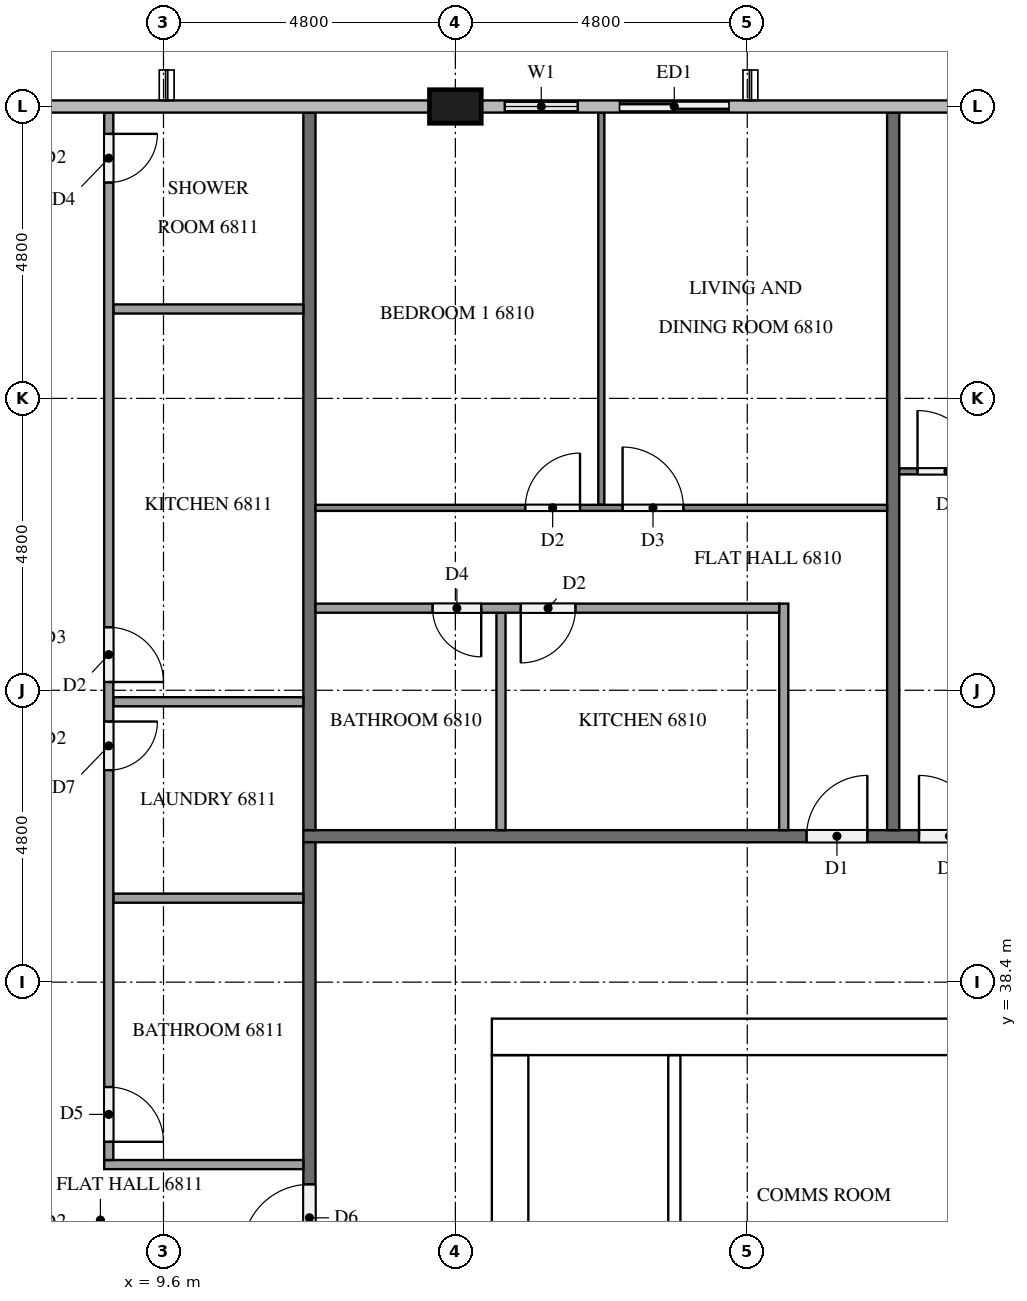
"""IFC4 building model, lengths in metres.
Left out: names, types, materials, properties, quantities, classifications, styles, units other than length and angle.
Written with IfcOpenShell. Run it as: python <this file> out.ifc"""

import sys

from ifc_helpers import new_model, si_unit, direction, frame, frame_2d, origin, origin_2d, place, context, subcontext, project, spatial, rectangle, extrude, element, fill, save


model = new_model("IFC4")
c1 = context("Model", 3, precision=1e-05, world=origin(), true_north=direction((0.0, 1.0)))
c2 = subcontext(c1, "Body", "Model", "MODEL_VIEW")
j1 = project(units=[si_unit("LENGTHUNIT", "METRE"), si_unit("PLANEANGLEUNIT", "RADIAN")], contexts=[c1])
p1 = place(None, origin())
s1 = spatial("IfcSite", under=j1, at=p1, CompositionType="ELEMENT")
p2 = place(p1, origin())
s2 = spatial("IfcBuilding", under=s1, at=p2, CompositionType="ELEMENT")
p3 = place(p2, frame((0.0, 0.0, 259.7)))
s3 = spatial("IfcBuildingStorey", under=s2, at=p3, CompositionType="ELEMENT", Elevation=259.7)
p4 = place(p3, frame((15.0, 37.5, 0.0), z_axis=(0.0, 0.0, 1.0), x_axis=(1.0, 0.0, 0.0)))
e1 = element("IfcWall", 1, at=p4, inside=s3, PredefinedType="SHEAR", context=c2, shape_type="SweptSolid", body=[
    extrude(rectangle(XDim=32.4, YDim=0.6, at=frame_2d((16.2, 0.0))), origin(), (0.0, 0.0, 1.0), 3.1),
])
p5 = place(p4, frame((15.3, 0.0, 0.0)))
e2 = element("IfcOpeningElement", 2, at=p5, cuts=e1, PredefinedType="OPENING", context=c2, shape_type="SweptSolid", body=[
    extrude(rectangle(XDim=1.8, YDim=2.1, at=frame_2d((0.9, 1.05))), frame((0.0, 0.31, 0.0), z_axis=(0.0, -1.0, 0.0), x_axis=(1.0, 0.0, 0.0)), (0.0, 0.0, 1.0), 0.62),
])
p6 = place(p4, frame((1.25, 0.0, 0.0)))
e3 = element("IfcOpeningElement", 3, at=p6, cuts=e1, PredefinedType="OPENING", context=c2, shape_type="SweptSolid", body=[
    extrude(rectangle(XDim=1.0, YDim=2.1, at=frame_2d((0.5, 1.05))), frame((0.0, 0.31, 0.0), z_axis=(0.0, -1.0, 0.0), x_axis=(1.0, 0.0, 0.0)), (0.0, 0.0, 1.0), 0.62),
])
p7 = place(p4, frame((4.988, 0.0, 0.0)))
e4 = element("IfcOpeningElement", 4, at=p7, cuts=e1, PredefinedType="OPENING", context=c2, shape_type="SweptSolid", body=[
    extrude(rectangle(XDim=1.0, YDim=2.1, at=frame_2d((0.5, 1.05))), frame((0.0, 0.31, 0.0), z_axis=(0.0, -1.0, 0.0), x_axis=(1.0, 0.0, 0.0)), (0.0, 0.0, 1.0), 0.62),
])
p8 = place(p3, frame((15.3, 15.6, 0.0), z_axis=(0.0, 0.0, 1.0), x_axis=(0.0, 1.0, 0.0)))
e5 = element("IfcWall", 5, at=p8, inside=s3, PredefinedType="SHEAR", context=c2, shape_type="SweptSolid", body=[
    extrude(rectangle(XDim=21.6, YDim=0.6, at=frame_2d((10.8, 0.0))), origin(), (0.0, 0.0, 1.0), 3.1),
])
p9 = place(p8, frame((5.16, 0.0, 0.0)))
e6 = element("IfcOpeningElement", 6, at=p9, cuts=e5, PredefinedType="OPENING", context=c2, shape_type="SweptSolid", body=[
    extrude(rectangle(XDim=1.2, YDim=2.1, at=frame_2d((0.6, 1.05))), frame((0.0, 0.31, 0.0), z_axis=(0.0, -1.0, 0.0), x_axis=(1.0, 0.0, 0.0)), (0.0, 0.0, 1.0), 0.62),
])
p10 = place(p3, frame((14.4, 52.8, 0.0), z_axis=(0.0, 0.0, 1.0), x_axis=(1.0, 0.0, 0.0)))
e7 = element("IfcColumn", 7, at=p10, inside=s3, PredefinedType="COLUMN", context=c2, shape_type="SweptSolid", body=[
    extrude(rectangle(XDim=0.85, YDim=0.55, at=origin_2d()), origin(), (0.0, 0.0, 1.0), 3.1),
])
p11 = place(p3, frame((19.2, 52.8, 0.0), z_axis=(0.0, 0.0, 1.0), x_axis=(-1.0, 0.0, 0.0)))
e8 = element("IfcWall", 8, at=p11, inside=s3, PredefinedType="SOLIDWALL", context=c2, shape_type="SweptSolid", body=[
    extrude(rectangle(XDim=4.375, YDim=0.15, at=frame_2d((2.188, 0.0))), origin(), (0.0, 0.0, 1.0), 3.1),
])
p12 = place(p11, frame((0.3, 0.0, 0.0)))
e9 = element("IfcOpeningElement", 9, at=p12, cuts=e8, PredefinedType="OPENING", context=c2, shape_type="SweptSolid", body=[
    extrude(rectangle(XDim=1.8, YDim=2.4, at=frame_2d((0.9, 1.2))), frame((0.0, 0.085, 0.0), z_axis=(0.0, -1.0, 0.0), x_axis=(1.0, 0.0, 0.0)), (0.0, 0.0, 1.0), 0.17),
])
p13 = place(p11, frame((2.788, 0.0, 0.9)))
e10 = element("IfcOpeningElement", 10, at=p13, cuts=e8, PredefinedType="OPENING", context=c2, shape_type="SweptSolid", body=[
    extrude(rectangle(XDim=1.2, YDim=1.4, at=frame_2d((0.6, 0.7))), frame((0.0, 0.085, 0.0), z_axis=(0.0, -1.0, 0.0), x_axis=(1.0, 0.0, 0.0)), (0.0, 0.0, 1.0), 0.17),
])
p14 = place(p3, frame((18.001, 31.475, 0.0), z_axis=(0.0, 0.0, 1.0), x_axis=(0.0, 1.0, 0.0)))
e11 = element("IfcWall", 11, at=p14, inside=s3, PredefinedType="PARTITIONING", context=c2, shape_type="SweptSolid", body=[
    extrude(rectangle(XDim=5.725, YDim=0.2, at=frame_2d((2.862, 0.0))), origin(), (0.0, 0.0, 1.0), 3.1),
])
p15 = place(p3, frame((11.9, 40.8, 0.0), z_axis=(0.0, 0.0, 1.0), x_axis=(1.0, 0.0, 0.0)))
e12 = element("IfcWall", 12, at=p15, inside=s3, PredefinedType="PARTITIONING", context=c2, shape_type="SweptSolid", body=[
    extrude(rectangle(XDim=38.6, YDim=0.2, at=frame_2d((19.3, 0.0))), origin(), (0.0, 0.0, 1.0), 3.1),
])
p16 = place(p15, frame((34.125, 0.0, 0.0)))
e13 = element("IfcOpeningElement", 13, at=p16, cuts=e12, PredefinedType="OPENING", context=c2, shape_type="SweptSolid", body=[
    extrude(rectangle(XDim=1.0, YDim=2.1, at=frame_2d((0.5, 1.05))), frame((0.0, 0.11, 0.0), z_axis=(0.0, -1.0, 0.0), x_axis=(1.0, 0.0, 0.0)), (0.0, 0.0, 1.0), 0.22),
])
p17 = place(p15, frame((24.525, 0.0, 0.0)))
e14 = element("IfcOpeningElement", 14, at=p17, cuts=e12, PredefinedType="OPENING", context=c2, shape_type="SweptSolid", body=[
    extrude(rectangle(XDim=1.0, YDim=2.1, at=frame_2d((0.5, 1.05))), frame((0.0, 0.11, 0.0), z_axis=(0.0, -1.0, 0.0), x_axis=(1.0, 0.0, 0.0)), (0.0, 0.0, 1.0), 0.22),
])
p18 = place(p15, frame((10.125, 0.0, 0.0)))
e15 = element("IfcOpeningElement", 15, at=p18, cuts=e12, PredefinedType="OPENING", context=c2, shape_type="SweptSolid", body=[
    extrude(rectangle(XDim=1.0, YDim=2.1, at=frame_2d((0.5, 1.05))), frame((0.0, 0.11, 0.0), z_axis=(0.0, -1.0, 0.0), x_axis=(1.0, 0.0, 0.0)), (0.0, 0.0, 1.0), 0.22),
])
p19 = place(p15, frame((8.275, 0.0, 0.0)))
e16 = element("IfcOpeningElement", 16, at=p19, cuts=e12, PredefinedType="OPENING", context=c2, shape_type="SweptSolid", body=[
    extrude(rectangle(XDim=1.0, YDim=2.1, at=frame_2d((0.5, 1.05))), frame((0.0, 0.11, 0.0), z_axis=(0.0, -1.0, 0.0), x_axis=(1.0, 0.0, 0.0)), (0.0, 0.0, 1.0), 0.22),
])
p20 = place(p3, frame((12.0, 12.1, 0.0), z_axis=(0.0, 0.0, 1.0), x_axis=(0.0, 1.0, 0.0)))
e17 = element("IfcWall", 17, at=p20, inside=s3, PredefinedType="PARTITIONING", context=c2, shape_type="SweptSolid", body=[
    extrude(rectangle(XDim=28.6, YDim=0.2, at=frame_2d((14.3, 0.0))), origin(), (0.0, 0.0, 1.0), 3.1),
])
p21 = place(p20, frame((21.875, 0.0, 0.0)))
e18 = element("IfcOpeningElement", 18, at=p21, cuts=e17, PredefinedType="OPENING", context=c2, shape_type="SweptSolid", body=[
    extrude(rectangle(XDim=1.1, YDim=2.1, at=frame_2d((0.55, 1.05))), frame((0.0, 0.11, 0.0), z_axis=(0.0, -1.0, 0.0), x_axis=(1.0, 0.0, 0.0)), (0.0, 0.0, 1.0), 0.22),
])
p22 = place(p20, frame((20.075, 0.0, 0.0)))
e19 = element("IfcOpeningElement", 19, at=p22, cuts=e17, PredefinedType="OPENING", context=c2, shape_type="SweptSolid", body=[
    extrude(rectangle(XDim=1.0, YDim=2.1, at=frame_2d((0.5, 1.05))), frame((0.0, 0.11, 0.0), z_axis=(0.0, -1.0, 0.0), x_axis=(1.0, 0.0, 0.0)), (0.0, 0.0, 1.0), 0.22),
])
p23 = place(p20, frame((5.675, 0.0, 0.0)))
e20 = element("IfcOpeningElement", 20, at=p23, cuts=e17, PredefinedType="OPENING", context=c2, shape_type="SweptSolid", body=[
    extrude(rectangle(XDim=1.0, YDim=2.1, at=frame_2d((0.5, 1.05))), frame((0.0, 0.11, 0.0), z_axis=(0.0, -1.0, 0.0), x_axis=(1.0, 0.0, 0.0)), (0.0, 0.0, 1.0), 0.22),
])
for number, where, z_axis, x_axis in (
    (21, (21.6, 52.7, 0.0), (0.0, 0.0, 1.0), (0.0, -1.0, 0.0)),
    (22, (12.0, 52.7, 0.0), (0.0, 0.0, 1.0), (0.0, -1.0, 0.0)),
):
    element("IfcWall", number, at=place(p3, frame(where, z_axis=z_axis, x_axis=x_axis)), inside=s3, PredefinedType="PARTITIONING", context=c2, shape_type="SweptSolid", body=[
        extrude(rectangle(XDim=11.8, YDim=0.2, at=frame_2d((5.9, 0.0))), origin(), (0.0, 0.0, 1.0), 3.1),
    ])
p24 = place(p3, frame((21.7, 46.8, 0.0), z_axis=(0.0, 0.0, 1.0), x_axis=(1.0, 0.0, 0.0)))
e23 = element("IfcWall", 23, at=p24, inside=s3, PredefinedType="PARTITIONING", context=c2, shape_type="SweptSolid", body=[
    extrude(rectangle(XDim=14.2, YDim=0.1, at=frame_2d((7.1, 0.0))), origin(), (0.0, 0.0, 1.0), 3.1),
])
p25 = place(p24, frame((0.3, 0.0, 0.0)))
e24 = element("IfcOpeningElement", 24, at=p25, cuts=e23, PredefinedType="OPENING", context=c2, shape_type="SweptSolid", body=[
    extrude(rectangle(XDim=1.0, YDim=2.1, at=frame_2d((0.5, 1.05))), frame((0.0, 0.06, 0.0), z_axis=(0.0, -1.0, 0.0), x_axis=(1.0, 0.0, 0.0)), (0.0, 0.0, 1.0), 0.12),
])
p26 = place(p24, frame((8.25, 0.0, 0.0)))
e25 = element("IfcOpeningElement", 25, at=p26, cuts=e23, PredefinedType="OPENING", context=c2, shape_type="SweptSolid", body=[
    extrude(rectangle(XDim=0.9, YDim=2.1, at=frame_2d((0.45, 1.05))), frame((0.0, 0.06, 0.0), z_axis=(0.0, -1.0, 0.0), x_axis=(1.0, 0.0, 0.0)), (0.0, 0.0, 1.0), 0.12),
])
p27 = place(p24, frame((9.85, 0.0, 0.0)))
e26 = element("IfcOpeningElement", 26, at=p27, cuts=e23, PredefinedType="OPENING", context=c2, shape_type="SweptSolid", body=[
    extrude(rectangle(XDim=0.9, YDim=2.1, at=frame_2d((0.45, 1.05))), frame((0.0, 0.06, 0.0), z_axis=(0.0, -1.0, 0.0), x_axis=(1.0, 0.0, 0.0)), (0.0, 0.0, 1.0), 0.12),
])
p28 = place(p3, frame((16.8, 46.25, 0.0), z_axis=(0.0, 0.0, 1.0), x_axis=(0.0, 1.0, 0.0)))
e27 = element("IfcWall", 27, at=p28, inside=s3, PredefinedType="PARTITIONING", context=c2, shape_type="SweptSolid", body=[
    extrude(rectangle(XDim=6.45, YDim=0.1, at=frame_2d((3.225, 0.0))), origin(), (0.0, 0.0, 1.0), 3.1),
])
p29 = place(p3, frame((12.1, 46.2, 0.0), z_axis=(0.0, 0.0, 1.0), x_axis=(1.0, 0.0, 0.0)))
e28 = element("IfcWall", 28, at=p29, inside=s3, PredefinedType="PARTITIONING", context=c2, shape_type="SweptSolid", body=[
    extrude(rectangle(XDim=9.4, YDim=0.1, at=frame_2d((4.7, 0.0))), origin(), (0.0, 0.0, 1.0), 3.1),
])
p30 = place(p29, frame((5.05, 0.0, 0.0)))
e29 = element("IfcOpeningElement", 29, at=p30, cuts=e28, PredefinedType="OPENING", context=c2, shape_type="SweptSolid", body=[
    extrude(rectangle(XDim=1.0, YDim=2.1, at=frame_2d((0.5, 1.05))), frame((0.0, 0.06, 0.0), z_axis=(0.0, -1.0, 0.0), x_axis=(1.0, 0.0, 0.0)), (0.0, 0.0, 1.0), 0.12),
])
p31 = place(p29, frame((3.45, 0.0, 0.0)))
e30 = element("IfcOpeningElement", 30, at=p31, cuts=e28, PredefinedType="OPENING", context=c2, shape_type="SweptSolid", body=[
    extrude(rectangle(XDim=0.9, YDim=2.1, at=frame_2d((0.45, 1.05))), frame((0.0, 0.06, 0.0), z_axis=(0.0, -1.0, 0.0), x_axis=(1.0, 0.0, 0.0)), (0.0, 0.0, 1.0), 0.12),
])
p32 = place(p3, frame((15.15, 40.9, 0.0), z_axis=(0.0, 0.0, 1.0), x_axis=(0.0, 1.0, 0.0)))
e31 = element("IfcWall", 31, at=p32, inside=s3, PredefinedType="PARTITIONING", context=c2, shape_type="SweptSolid", body=[
    extrude(rectangle(XDim=3.575, YDim=0.15, at=frame_2d((1.788, 0.0))), origin(), (0.0, 0.0, 1.0), 3.1),
])
p33 = place(p3, frame((19.8, 40.9, 0.0), z_axis=(0.0, 0.0, 1.0), x_axis=(0.0, 1.0, 0.0)))
e32 = element("IfcWall", 32, at=p33, inside=s3, PredefinedType="PARTITIONING", context=c2, shape_type="SweptSolid", body=[
    extrude(rectangle(XDim=3.725, YDim=0.15, at=frame_2d((1.863, 0.0))), origin(), (0.0, 0.0, 1.0), 3.1),
])
p34 = place(p3, frame((19.725, 44.55, 0.0), z_axis=(0.0, 0.0, 1.0), x_axis=(-1.0, 0.0, 0.0)))
e33 = element("IfcWall", 33, at=p34, inside=s3, PredefinedType="PARTITIONING", context=c2, shape_type="SweptSolid", body=[
    extrude(rectangle(XDim=7.625, YDim=0.15, at=frame_2d((3.812, 0.0))), origin(), (0.0, 0.0, 1.0), 3.1),
])
p35 = place(p34, frame((3.35, 0.0, 0.0)))
e34 = element("IfcOpeningElement", 34, at=p35, cuts=e33, PredefinedType="OPENING", context=c2, shape_type="SweptSolid", body=[
    extrude(rectangle(XDim=0.9, YDim=2.1, at=frame_2d((0.45, 1.05))), frame((0.0, 0.085, 0.0), z_axis=(0.0, -1.0, 0.0), x_axis=(1.0, 0.0, 0.0)), (0.0, 0.0, 1.0), 0.17),
])
p36 = place(p34, frame((4.9, 0.0, 0.0)))
e35 = element("IfcOpeningElement", 35, at=p36, cuts=e33, PredefinedType="OPENING", context=c2, shape_type="SweptSolid", body=[
    extrude(rectangle(XDim=0.8, YDim=2.1, at=frame_2d((0.4, 1.05))), frame((0.0, 0.085, 0.0), z_axis=(0.0, -1.0, 0.0), x_axis=(1.0, 0.0, 0.0)), (0.0, 0.0, 1.0), 0.17),
])
for number, where, z_axis, x_axis in (
    (36, (11.9, 39.781, 0.0), (0.0, 0.0, 1.0), (-1.0, 0.0, 0.0)),
    (37, (11.9, 43.011, 0.0), (0.0, 0.0, 1.0), (-1.0, 0.0, 0.0)),
    (38, (11.9, 49.47, 0.0), (0.0, 0.0, 1.0), (-1.0, 0.0, 0.0)),
):
    element("IfcWall", number, at=place(p3, frame(where, z_axis=z_axis, x_axis=x_axis)), inside=s3, PredefinedType="PARTITIONING", context=c2, shape_type="SweptSolid", body=[
        extrude(rectangle(XDim=3.125, YDim=0.15, at=frame_2d((1.562, 0.0))), origin(), (0.0, 0.0, 1.0), 3.1),
    ])
p37 = place(p3, frame((11.9, 35.4, 0.0), z_axis=(0.0, 0.0, 1.0), x_axis=(-1.0, 0.0, 0.0)))
e39 = element("IfcWall", 39, at=p37, inside=s3, PredefinedType="PARTITIONING", context=c2, shape_type="SweptSolid", body=[
    extrude(rectangle(XDim=3.275, YDim=0.15, at=frame_2d((1.637, 0.0))), origin(), (0.0, 0.0, 1.0), 3.1),
])
p38 = place(p3, frame((8.7, 52.7, 0.0), z_axis=(0.0, 0.0, 1.0), x_axis=(0.0, -1.0, 0.0)))
e40 = element("IfcWall", 40, at=p38, inside=s3, PredefinedType="PARTITIONING", context=c2, shape_type="SweptSolid", body=[
    extrude(rectangle(XDim=17.225, YDim=0.15, at=frame_2d((8.612, 0.0))), origin(), (0.0, 0.0, 1.0), 3.1),
])
p39 = place(p38, frame((16.025, 0.0, 0.0)))
e41 = element("IfcOpeningElement", 41, at=p39, cuts=e40, PredefinedType="OPENING", context=c2, shape_type="SweptSolid", body=[
    extrude(rectangle(XDim=0.9, YDim=2.1, at=frame_2d((0.45, 1.05))), frame((0.0, 0.085, 0.0), z_axis=(0.0, -1.0, 0.0), x_axis=(1.0, 0.0, 0.0)), (0.0, 0.0, 1.0), 0.17),
])
p40 = place(p38, frame((10.014, 0.0, 0.0)))
e42 = element("IfcOpeningElement", 42, at=p40, cuts=e40, PredefinedType="OPENING", context=c2, shape_type="SweptSolid", body=[
    extrude(rectangle(XDim=0.8, YDim=2.1, at=frame_2d((0.4, 1.05))), frame((0.0, 0.085, 0.0), z_axis=(0.0, -1.0, 0.0), x_axis=(1.0, 0.0, 0.0)), (0.0, 0.0, 1.0), 0.17),
])
p41 = place(p38, frame((8.464, 0.0, 0.0)))
e43 = element("IfcOpeningElement", 43, at=p41, cuts=e40, PredefinedType="OPENING", context=c2, shape_type="SweptSolid", body=[
    extrude(rectangle(XDim=0.9, YDim=2.1, at=frame_2d((0.45, 1.05))), frame((0.0, 0.085, 0.0), z_axis=(0.0, -1.0, 0.0), x_axis=(1.0, 0.0, 0.0)), (0.0, 0.0, 1.0), 0.17),
])
p42 = place(p38, frame((0.35, 0.0, 0.0)))
e44 = element("IfcOpeningElement", 44, at=p42, cuts=e40, PredefinedType="OPENING", context=c2, shape_type="SweptSolid", body=[
    extrude(rectangle(XDim=0.8, YDim=2.1, at=frame_2d((0.4, 1.05))), frame((0.0, 0.085, 0.0), z_axis=(0.0, -1.0, 0.0), x_axis=(1.0, 0.0, 0.0)), (0.0, 0.0, 1.0), 0.17),
])
p43 = place(p12, origin())
e45 = element("IfcDoor", 45, at=p43, inside=s3, OperationType="SLIDING_TO_RIGHT", PredefinedType="DOOR", context=c2, shape_type="SweptSolid", body=[
    extrude(rectangle(XDim=1.8, YDim=2.4, at=frame_2d((0.9, 1.2))), frame((0.0, 0.025, 0.0), z_axis=(0.0, -1.0, 0.0), x_axis=(1.0, 0.0, 0.0)), (0.0, 0.0, 1.0), 0.05),
])
fill(e9, e45)
p44 = place(p13, origin())
e46 = element("IfcWindow", 46, at=p44, inside=s3, PartitioningType="SINGLE_PANEL", PredefinedType="WINDOW", context=c2, shape_type="SweptSolid", body=[
    extrude(rectangle(XDim=1.2, YDim=1.4, at=frame_2d((0.6, 0.7))), frame((0.0, 0.03, 0.0), z_axis=(0.0, -1.0, 0.0), x_axis=(1.0, 0.0, 0.0)), (0.0, 0.0, 1.0), 0.06),
])
fill(e10, e46)
p45 = place(p6, origin())
e47 = element("IfcDoor", 47, at=p45, inside=s3, OperationType="SINGLE_SWING_LEFT", PredefinedType="DOOR", context=c2, shape_type="SweptSolid", body=[
    extrude(rectangle(XDim=1.0, YDim=2.1, at=frame_2d((0.5, 1.05))), frame((0.0, 0.025, 0.0), z_axis=(0.0, -1.0, 0.0), x_axis=(1.0, 0.0, 0.0)), (0.0, 0.0, 1.0), 0.05),
])
fill(e3, e47)
p46 = place(p7, origin())
e48 = element("IfcDoor", 48, at=p46, inside=s3, OperationType="SINGLE_SWING_RIGHT", PredefinedType="DOOR", context=c2, shape_type="SweptSolid", body=[
    extrude(rectangle(XDim=1.0, YDim=2.1, at=frame_2d((0.5, 1.05))), frame((0.0, 0.025, 0.0), z_axis=(0.0, -1.0, 0.0), x_axis=(1.0, 0.0, 0.0)), (0.0, 0.0, 1.0), 0.05),
])
fill(e4, e48)
p47 = place(p18, origin())
e49 = element("IfcDoor", 49, at=p47, inside=s3, OperationType="SINGLE_SWING_LEFT", PredefinedType="DOOR", context=c2, shape_type="SweptSolid", body=[
    extrude(rectangle(XDim=1.0, YDim=2.1, at=frame_2d((0.5, 1.05))), frame((0.0, 0.025, 0.0), z_axis=(0.0, -1.0, 0.0), x_axis=(1.0, 0.0, 0.0)), (0.0, 0.0, 1.0), 0.05),
])
fill(e15, e49)
p48 = place(p19, origin())
e50 = element("IfcDoor", 50, at=p48, inside=s3, OperationType="SINGLE_SWING_RIGHT", PredefinedType="DOOR", context=c2, shape_type="SweptSolid", body=[
    extrude(rectangle(XDim=1.0, YDim=2.1, at=frame_2d((0.5, 1.05))), frame((0.0, 0.025, 0.0), z_axis=(0.0, -1.0, 0.0), x_axis=(1.0, 0.0, 0.0)), (0.0, 0.0, 1.0), 0.05),
])
fill(e16, e50)
p49 = place(p21, origin())
e51 = element("IfcDoor", 51, at=p49, inside=s3, OperationType="SINGLE_SWING_LEFT", PredefinedType="DOOR", context=c2, shape_type="SweptSolid", body=[
    extrude(rectangle(XDim=1.1, YDim=2.1, at=frame_2d((0.55, 1.05))), frame((0.0, 0.025, 0.0), z_axis=(0.0, -1.0, 0.0), x_axis=(1.0, 0.0, 0.0)), (0.0, 0.0, 1.0), 0.05),
])
fill(e18, e51)
p50 = place(p25, origin())
e52 = element("IfcDoor", 52, at=p50, inside=s3, OperationType="SINGLE_SWING_LEFT", PredefinedType="DOOR", context=c2, shape_type="SweptSolid", body=[
    extrude(rectangle(XDim=1.0, YDim=2.1, at=frame_2d((0.5, 1.05))), frame((0.0, 0.025, 0.0), z_axis=(0.0, -1.0, 0.0), x_axis=(1.0, 0.0, 0.0)), (0.0, 0.0, 1.0), 0.05),
])
fill(e24, e52)
p51 = place(p30, origin())
e53 = element("IfcDoor", 53, at=p51, inside=s3, OperationType="SINGLE_SWING_LEFT", PredefinedType="DOOR", context=c2, shape_type="SweptSolid", body=[
    extrude(rectangle(XDim=1.0, YDim=2.1, at=frame_2d((0.5, 1.05))), frame((0.0, 0.025, 0.0), z_axis=(0.0, -1.0, 0.0), x_axis=(1.0, 0.0, 0.0)), (0.0, 0.0, 1.0), 0.05),
])
fill(e29, e53)
p52 = place(p31, origin())
e54 = element("IfcDoor", 54, at=p52, inside=s3, OperationType="SINGLE_SWING_RIGHT", PredefinedType="DOOR", context=c2, shape_type="SweptSolid", body=[
    extrude(rectangle(XDim=0.9, YDim=2.1, at=frame_2d((0.45, 1.05))), frame((0.0, 0.025, 0.0), z_axis=(0.0, -1.0, 0.0), x_axis=(1.0, 0.0, 0.0)), (0.0, 0.0, 1.0), 0.05),
])
fill(e30, e54)
p53 = place(p35, origin())
e55 = element("IfcDoor", 55, at=p53, inside=s3, OperationType="SINGLE_SWING_RIGHT", PredefinedType="DOOR", context=c2, shape_type="SweptSolid", body=[
    extrude(rectangle(XDim=0.9, YDim=2.1, at=frame_2d((0.45, 1.05))), frame((0.0, 0.025, 0.0), z_axis=(0.0, -1.0, 0.0), x_axis=(1.0, 0.0, 0.0)), (0.0, 0.0, 1.0), 0.05),
])
fill(e34, e55)
p54 = place(p36, origin())
e56 = element("IfcDoor", 56, at=p54, inside=s3, OperationType="SINGLE_SWING_LEFT", PredefinedType="DOOR", context=c2, shape_type="SweptSolid", body=[
    extrude(rectangle(XDim=0.8, YDim=2.1, at=frame_2d((0.4, 1.05))), frame((0.0, 0.025, 0.0), z_axis=(0.0, -1.0, 0.0), x_axis=(1.0, 0.0, 0.0)), (0.0, 0.0, 1.0), 0.05),
])
fill(e35, e56)
p55 = place(p39, origin())
e57 = element("IfcDoor", 57, at=p55, inside=s3, OperationType="SINGLE_SWING_RIGHT", PredefinedType="DOOR", context=c2, shape_type="SweptSolid", body=[
    extrude(rectangle(XDim=0.9, YDim=2.1, at=frame_2d((0.45, 1.05))), frame((0.0, 0.025, 0.0), z_axis=(0.0, -1.0, 0.0), x_axis=(1.0, 0.0, 0.0)), (0.0, 0.0, 1.0), 0.05),
])
fill(e41, e57)
p56 = place(p40, origin())
e58 = element("IfcDoor", 58, at=p56, inside=s3, OperationType="SINGLE_SWING_LEFT", PredefinedType="DOOR", context=c2, shape_type="SweptSolid", body=[
    extrude(rectangle(XDim=0.8, YDim=2.1, at=frame_2d((0.4, 1.05))), frame((0.0, 0.025, 0.0), z_axis=(0.0, -1.0, 0.0), x_axis=(1.0, 0.0, 0.0)), (0.0, 0.0, 1.0), 0.05),
])
fill(e42, e58)
p57 = place(p41, origin())
e59 = element("IfcDoor", 59, at=p57, inside=s3, OperationType="SINGLE_SWING_RIGHT", PredefinedType="DOOR", context=c2, shape_type="SweptSolid", body=[
    extrude(rectangle(XDim=0.9, YDim=2.1, at=frame_2d((0.45, 1.05))), frame((0.0, 0.025, 0.0), z_axis=(0.0, -1.0, 0.0), x_axis=(1.0, 0.0, 0.0)), (0.0, 0.0, 1.0), 0.05),
])
fill(e43, e59)
p58 = place(p42, origin())
e60 = element("IfcDoor", 60, at=p58, inside=s3, OperationType="SINGLE_SWING_LEFT", PredefinedType="DOOR", context=c2, shape_type="SweptSolid", body=[
    extrude(rectangle(XDim=0.8, YDim=2.1, at=frame_2d((0.4, 1.05))), frame((0.0, 0.025, 0.0), z_axis=(0.0, -1.0, 0.0), x_axis=(1.0, 0.0, 0.0)), (0.0, 0.0, 1.0), 0.05),
])
fill(e44, e60)
save(model, sys.argv[1])
